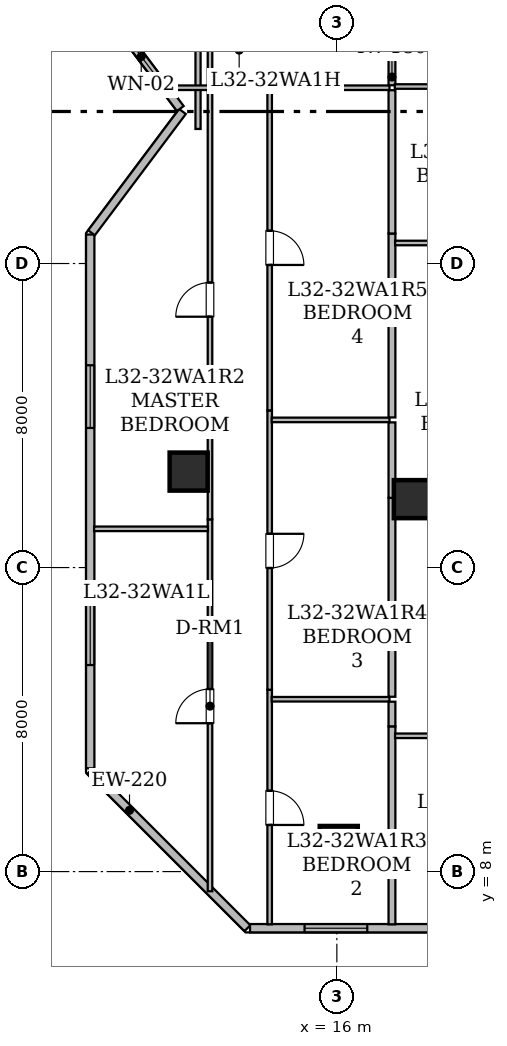
"""IFC4 building model, lengths in metres.
Left out: names, types, materials, properties, quantities, classifications, styles, units other than length and angle.
Written with IfcOpenShell. Run it as: python <this file> out.ifc"""

import sys

from ifc_helpers import new_model, si_unit, direction, frame, frame_2d, origin, origin_2d, place, context, subcontext, project, spatial, rectangle, hollow_rectangle, extrude, element, fill, save


model = new_model("IFC4")
c1 = context("Model", 3, precision=1e-05, world=origin(), true_north=direction((0.0, 1.0)))
c2 = subcontext(c1, "Body", "Model", "MODEL_VIEW")
j1 = project(units=[si_unit("LENGTHUNIT", "METRE"), si_unit("PLANEANGLEUNIT", "RADIAN")], contexts=[c1])
p1 = place(None, origin())
s1 = spatial("IfcSite", under=j1, at=p1, CompositionType="ELEMENT")
p2 = place(p1, origin())
s2 = spatial("IfcBuilding", under=s1, at=p2, CompositionType="ELEMENT")
p3 = place(p2, frame((0.0, 0.0, 127.45)))
s3 = spatial("IfcBuildingStorey", under=s2, at=p3, CompositionType="ELEMENT", Elevation=127.45)
for number, where, z_axis, x_axis in (
    (1, (16.05, 8.7, 0.0), (0.0, 0.0, 1.0), (1.0, 0.0, 0.0)),
    (2, (12.1, 18.525, 0.0), (0.0, 0.0, 1.0), (1.0, 0.0, 0.0)),
    (3, (18.0, 17.8, 0.0), (0.0, 0.0, 1.0), (1.0, 0.0, 0.0)),
):
    element("IfcColumn", number, at=place(p3, frame(where, z_axis=z_axis, x_axis=x_axis)), inside=s3, PredefinedType="COLUMN", context=c2, shape_type="SweptSolid", body=[
        extrude(hollow_rectangle(XDim=1.0, YDim=1.0, WallThickness=0.05, at=origin_2d()), origin(), (0.0, 0.0, 1.0), 3.65),
    ])
p4 = place(p3, frame((13.646, 6.51, 0.0), z_axis=(0.0, 0.0, 1.0), x_axis=(-0.707106781187, 0.707106781187, 0.0)))
e4 = element("IfcWall", 4, at=p4, inside=s3, PredefinedType="STANDARD", context=c2, shape_type="SweptSolid", body=[
    extrude(rectangle(XDim=5.849, YDim=0.22, at=frame_2d((2.925, 0.0))), origin(), (0.0, 0.0, 1.0), 3.43),
])
p5 = place(p3, frame((9.51, 10.717, 0.0), z_axis=(0.0, 0.0, 1.0), x_axis=(0.0, 1.0, 0.0)))
e5 = element("IfcWall", 5, at=p5, inside=s3, PredefinedType="STANDARD", context=c2, shape_type="SweptSolid", body=[
    extrude(rectangle(XDim=14.046, YDim=0.22, at=frame_2d((7.023, 0.0))), origin(), (0.0, 0.0, 1.0), 3.43),
])
p6 = place(p5, frame((2.718, 0.0, 0.85)))
e6 = element("IfcOpeningElement", 6, at=p6, cuts=e5, PredefinedType="OPENING", context=c2, shape_type="SweptSolid", body=[
    extrude(rectangle(XDim=1.65, YDim=1.55, at=frame_2d((0.825, 0.775))), frame((0.0, 0.12, 0.0), z_axis=(0.0, -1.0, 0.0), x_axis=(1.0, 0.0, 0.0)), (0.0, 0.0, 1.0), 0.24),
])
p7 = place(p5, frame((8.956, 0.0, 0.85)))
e7 = element("IfcOpeningElement", 7, at=p7, cuts=e5, PredefinedType="OPENING", context=c2, shape_type="SweptSolid", body=[
    extrude(rectangle(XDim=1.65, YDim=1.55, at=frame_2d((0.825, 0.775))), frame((0.0, 0.12, 0.0), z_axis=(0.0, -1.0, 0.0), x_axis=(1.0, 0.0, 0.0)), (0.0, 0.0, 1.0), 0.24),
])
p8 = place(p3, frame((9.544, 24.808, 0.0), z_axis=(0.0, 0.0, 1.0), x_axis=(0.600019580308, 0.799985314394, 0.0)))
e8 = element("IfcWall", 8, at=p8, inside=s3, PredefinedType="STANDARD", context=c2, shape_type="SweptSolid", body=[
    extrude(rectangle(XDim=3.99, YDim=0.22, at=frame_2d((1.995, 0.0))), origin(), (0.0, 0.0, 1.0), 3.43),
])
p9 = place(p3, frame((11.881, 28.077, 0.0), z_axis=(0.0, 0.0, 1.0), x_axis=(-0.600158184825, 0.799881336942, 0.0)))
e9 = element("IfcWall", 9, at=p9, inside=s3, PredefinedType="STANDARD", context=c2, shape_type="SweptSolid", body=[
    extrude(rectangle(XDim=3.951, YDim=0.22, at=frame_2d((1.975, 0.0))), origin(), (0.0, 0.0, 1.0), 3.43),
])
p10 = place(p9, frame((0.964, 0.0, 0.85)))
e10 = element("IfcOpeningElement", 10, at=p10, cuts=e9, PredefinedType="OPENING", context=c2, shape_type="SweptSolid", body=[
    extrude(rectangle(XDim=1.5, YDim=1.6, at=frame_2d((0.75, 0.8))), frame((0.0, 0.12, 0.0), z_axis=(0.0, -1.0, 0.0), x_axis=(1.0, 0.0, 0.0)), (0.0, 0.0, 1.0), 0.24),
])
p11 = place(p3, frame((52.283, 6.51, 0.0), z_axis=(0.0, 0.0, 1.0), x_axis=(-1.0, 0.0, 0.0)))
e11 = element("IfcWall", 11, at=p11, inside=s3, PredefinedType="STANDARD", context=c2, shape_type="SweptSolid", body=[
    extrude(rectangle(XDim=38.568, YDim=0.22, at=frame_2d((19.284, 0.0))), origin(), (0.0, 0.0, 1.0), 3.43),
])
p12 = place(p11, frame((20.408, 0.0, 0.85)))
e12 = element("IfcOpeningElement", 12, at=p12, cuts=e11, PredefinedType="OPENING", context=c2, shape_type="SweptSolid", body=[
    extrude(rectangle(XDim=1.65, YDim=1.55, at=frame_2d((0.825, 0.775))), frame((0.0, 0.12, 0.0), z_axis=(0.0, -1.0, 0.0), x_axis=(1.0, 0.0, 0.0)), (0.0, 0.0, 1.0), 0.24),
])
p13 = place(p11, frame((35.483, 0.0, 0.85)))
e13 = element("IfcOpeningElement", 13, at=p13, cuts=e11, PredefinedType="OPENING", context=c2, shape_type="SweptSolid", body=[
    extrude(rectangle(XDim=1.65, YDim=1.55, at=frame_2d((0.825, 0.775))), frame((0.0, 0.12, 0.0), z_axis=(0.0, -1.0, 0.0), x_axis=(1.0, 0.0, 0.0)), (0.0, 0.0, 1.0), 0.24),
])
p14 = place(p11, frame((25.888, 0.0, 0.85)))
e14 = element("IfcOpeningElement", 14, at=p14, cuts=e11, PredefinedType="OPENING", context=c2, shape_type="SweptSolid", body=[
    extrude(rectangle(XDim=1.65, YDim=1.55, at=frame_2d((0.825, 0.775))), frame((0.0, 0.12, 0.0), z_axis=(0.0, -1.0, 0.0), x_axis=(1.0, 0.0, 0.0)), (0.0, 0.0, 1.0), 0.24),
])
p15 = place(p11, frame((28.168, 0.0, 0.8)))
e15 = element("IfcOpeningElement", 15, at=p15, cuts=e11, PredefinedType="OPENING", context=c2, shape_type="SweptSolid", body=[
    extrude(rectangle(XDim=1.2, YDim=1.5, at=frame_2d((0.6, 0.75))), frame((0.0, 0.12, 0.0), z_axis=(0.0, -1.0, 0.0), x_axis=(1.0, 0.0, 0.0)), (0.0, 0.0, 1.0), 0.24),
])
p16 = place(p11, frame((31.371, 0.0, 0.85)))
e16 = element("IfcOpeningElement", 16, at=p16, cuts=e11, PredefinedType="OPENING", context=c2, shape_type="SweptSolid", body=[
    extrude(rectangle(XDim=1.65, YDim=1.55, at=frame_2d((0.825, 0.775))), frame((0.0, 0.12, 0.0), z_axis=(0.0, -1.0, 0.0), x_axis=(1.0, 0.0, 0.0)), (0.0, 0.0, 1.0), 0.24),
])
p17 = place(p11, frame((13.143, 0.0, 0.85)))
e17 = element("IfcOpeningElement", 17, at=p17, cuts=e11, PredefinedType="OPENING", context=c2, shape_type="SweptSolid", body=[
    extrude(rectangle(XDim=1.65, YDim=1.55, at=frame_2d((0.825, 0.775))), frame((0.0, 0.12, 0.0), z_axis=(0.0, -1.0, 0.0), x_axis=(1.0, 0.0, 0.0)), (0.0, 0.0, 1.0), 0.24),
])
p18 = place(p11, frame((6.688, 0.0, 0.85)))
e18 = element("IfcOpeningElement", 18, at=p18, cuts=e11, PredefinedType="OPENING", context=c2, shape_type="SweptSolid", body=[
    extrude(rectangle(XDim=1.65, YDim=1.55, at=frame_2d((0.825, 0.775))), frame((0.0, 0.12, 0.0), z_axis=(0.0, -1.0, 0.0), x_axis=(1.0, 0.0, 0.0)), (0.0, 0.0, 1.0), 0.24),
])
p19 = place(p3, frame((12.347, 27.54, 0.0), z_axis=(0.0, 0.0, 1.0), x_axis=(0.0, 1.0, 0.0)))
e19 = element("IfcWall", 19, at=p19, inside=s3, PredefinedType="PARTITIONING", context=c2, shape_type="SweptSolid", body=[
    extrude(rectangle(XDim=6.178, YDim=0.135, at=frame_2d((3.089, 0.0))), origin(), (0.0, 0.0, 1.0), 2.876),
])
p20 = place(p3, frame((12.662, 7.483, 0.0), z_axis=(0.0, 0.0, 1.0), x_axis=(0.0, 1.0, 0.0)))
e20 = element("IfcWall", 20, at=p20, inside=s3, PredefinedType="PARTITIONING", context=c2, shape_type="SweptSolid", body=[
    extrude(rectangle(XDim=9.785, YDim=0.12, at=frame_2d((4.893, 0.0))), origin(), (0.0, 0.0, 1.0), 2.876),
])
p21 = place(p20, frame((4.421, 0.0, 0.0)))
e21 = element("IfcOpeningElement", 21, at=p21, cuts=e20, PredefinedType="OPENING", context=c2, shape_type="SweptSolid", body=[
    extrude(rectangle(XDim=0.9, YDim=2.1, at=frame_2d((0.45, 1.05))), frame((0.0, 0.07, 0.0), z_axis=(0.0, -1.0, 0.0), x_axis=(1.0, 0.0, 0.0)), (0.0, 0.0, 1.0), 0.14),
])
p22 = place(p3, frame((12.662, 17.268, 0.0), z_axis=(0.0, 0.0, 1.0), x_axis=(0.0, 1.0, 0.0)))
e22 = element("IfcWall", 22, at=p22, inside=s3, PredefinedType="PARTITIONING", context=c2, shape_type="SweptSolid", body=[
    extrude(rectangle(XDim=14.022, YDim=0.12, at=frame_2d((7.011, 0.0))), origin(), (0.0, 0.0, 1.0), 2.647),
])
p23 = place(p22, frame((5.332, 0.0, 0.0)))
e23 = element("IfcOpeningElement", 23, at=p23, cuts=e22, PredefinedType="OPENING", context=c2, shape_type="SweptSolid", body=[
    extrude(rectangle(XDim=0.9, YDim=2.1, at=frame_2d((0.45, 1.05))), frame((0.0, 0.07, 0.0), z_axis=(0.0, -1.0, 0.0), x_axis=(1.0, 0.0, 0.0)), (0.0, 0.0, 1.0), 0.14),
])
p24 = place(p3, frame((15.327, 28.625, 0.0), z_axis=(0.0, 0.0, 1.0), x_axis=(-1.0, 0.0, 0.0)))
e24 = element("IfcWall", 24, at=p24, inside=s3, PredefinedType="PARTITIONING", context=c2, shape_type="SweptSolid", body=[
    extrude(rectangle(XDim=3.845, YDim=0.12, at=frame_2d((1.922, 0.0))), origin(), (0.0, 0.0, 1.0), 2.876),
])
p25 = place(p3, frame((14.232, 12.784, 0.0), z_axis=(0.0, 0.0, 1.0), x_axis=(0.0, -1.0, 0.0)))
e25 = element("IfcWall", 25, at=p25, inside=s3, PredefinedType="PARTITIONING", context=c2, shape_type="SweptSolid", body=[
    extrude(rectangle(XDim=6.172, YDim=0.12, at=frame_2d((3.086, 0.0))), origin(), (0.0, 0.0, 1.0), 2.876),
])
p26 = place(p25, frame((2.657, 0.0, 0.0)))
e26 = element("IfcOpeningElement", 26, at=p26, cuts=e25, PredefinedType="OPENING", context=c2, shape_type="SweptSolid", body=[
    extrude(rectangle(XDim=0.9, YDim=2.1, at=frame_2d((0.45, 1.05))), frame((0.0, 0.07, 0.0), z_axis=(0.0, -1.0, 0.0), x_axis=(1.0, 0.0, 0.0)), (0.0, 0.0, 1.0), 0.14),
])
p27 = place(p3, frame((14.232, 20.134, 0.0), z_axis=(0.0, 0.0, 1.0), x_axis=(0.0, -1.0, 0.0)))
e27 = element("IfcWall", 27, at=p27, inside=s3, PredefinedType="PARTITIONING", context=c2, shape_type="SweptSolid", body=[
    extrude(rectangle(XDim=7.35, YDim=0.12, at=frame_2d((3.675, 0.0))), origin(), (0.0, 0.0, 1.0), 2.647),
])
p28 = place(p27, frame((3.246, 0.0, 0.0)))
e28 = element("IfcOpeningElement", 28, at=p28, cuts=e27, PredefinedType="OPENING", context=c2, shape_type="SweptSolid", body=[
    extrude(rectangle(XDim=0.9, YDim=2.1, at=frame_2d((0.45, 1.05))), frame((0.0, 0.07, 0.0), z_axis=(0.0, -1.0, 0.0), x_axis=(1.0, 0.0, 0.0)), (0.0, 0.0, 1.0), 0.14),
])
p29 = place(p3, frame((17.385, 28.625, 0.0), z_axis=(0.0, 0.0, 1.0), x_axis=(-1.0, 0.0, 0.0)))
e29 = element("IfcWall", 29, at=p29, inside=s3, PredefinedType="PARTITIONING", context=c2, shape_type="SweptSolid", body=[
    extrude(rectangle(XDim=2.058, YDim=0.12, at=frame_2d((1.029, 0.0))), origin(), (0.0, 0.0, 1.0), 3.43),
])
p30 = place(p3, frame((14.232, 28.69, 0.0), z_axis=(0.0, 0.0, 1.0), x_axis=(0.0, -1.0, 0.0)))
e30 = element("IfcWall", 30, at=p30, inside=s3, PredefinedType="PARTITIONING", context=c2, shape_type="SweptSolid", body=[
    extrude(rectangle(XDim=8.556, YDim=0.12, at=frame_2d((4.278, 0.0))), origin(), (0.0, 0.0, 1.0), 3.43),
])
p31 = place(p30, frame((3.828, 0.0, 0.0)))
e31 = element("IfcOpeningElement", 31, at=p31, cuts=e30, PredefinedType="OPENING", context=c2, shape_type="SweptSolid", body=[
    extrude(rectangle(XDim=0.9, YDim=2.1, at=frame_2d((0.45, 1.05))), frame((0.0, 0.07, 0.0), z_axis=(0.0, -1.0, 0.0), x_axis=(1.0, 0.0, 0.0)), (0.0, 0.0, 1.0), 0.14),
])
p32 = place(p3, frame((17.45, 30.14, 0.0), z_axis=(0.0, 0.0, 1.0), x_axis=(0.0, -1.0, 0.0)))
e32 = element("IfcWall", 32, at=p32, inside=s3, PredefinedType="STANDARD", context=c2, shape_type="SweptSolid", body=[
    extrude(rectangle(XDim=1.45, YDim=0.18, at=frame_2d((0.725, 0.0))), origin(), (0.0, 0.0, 1.0), 3.43),
])
p33 = place(p3, frame((9.612, 17.019, 0.0), z_axis=(0.0, 0.0, 1.0), x_axis=(1.0, 0.0, 0.0)))
e33 = element("IfcWall", 33, at=p33, inside=s3, PredefinedType="PARTITIONING", context=c2, shape_type="SweptSolid", body=[
    extrude(rectangle(XDim=2.996, YDim=0.12, at=frame_2d((1.498, 0.0))), origin(), (0.0, 0.0, 1.0), 2.876),
])
p34 = place(p3, frame((14.286, 12.535, 0.0), z_axis=(0.0, 0.0, 1.0), x_axis=(1.0, 0.0, 0.0)))
e34 = element("IfcWall", 34, at=p34, inside=s3, PredefinedType="PARTITIONING", context=c2, shape_type="SweptSolid", body=[
    extrude(rectangle(XDim=3.099, YDim=0.12, at=frame_2d((1.55, 0.0))), origin(), (0.0, 0.0, 1.0), 2.647),
])
p35 = place(p3, frame((17.45, 11.822, 0.0), z_axis=(0.0, 0.0, 1.0), x_axis=(0.0, -1.0, 0.0)))
e35 = element("IfcWall", 35, at=p35, inside=s3, PredefinedType="STANDARD", context=c2, shape_type="SweptSolid", body=[
    extrude(rectangle(XDim=5.21, YDim=0.18, at=frame_2d((2.605, 0.0))), origin(), (0.0, 0.0, 1.0), 2.876),
])
p36 = place(p3, frame((17.45, 12.47, 0.0), z_axis=(0.0, 0.0, 1.0), x_axis=(0.0, -1.0, 0.0)))
e36 = element("IfcWall", 36, at=p36, inside=s3, PredefinedType="STANDARD", context=c2, shape_type="SweptSolid", body=[
    extrude(rectangle(XDim=0.648, YDim=0.18, at=frame_2d((0.324, 0.0))), origin(), (0.0, 0.0, 1.0), 3.43),
])
p37 = place(p3, frame((14.286, 19.885, 0.0), z_axis=(0.0, 0.0, 1.0), x_axis=(1.0, 0.0, 0.0)))
e37 = element("IfcWall", 37, at=p37, inside=s3, PredefinedType="PARTITIONING", context=c2, shape_type="SweptSolid", body=[
    extrude(rectangle(XDim=3.099, YDim=0.12, at=frame_2d((1.55, 0.0))), origin(), (0.0, 0.0, 1.0), 3.43),
])
p38 = place(p3, frame((17.45, 17.833, 0.0), z_axis=(0.0, 0.0, 1.0), x_axis=(0.0, -1.0, 0.0)))
e38 = element("IfcWall", 38, at=p38, inside=s3, PredefinedType="STANDARD", context=c2, shape_type="SweptSolid", body=[
    extrude(rectangle(XDim=5.233, YDim=0.18, at=frame_2d((2.616, 0.0))), origin(), (0.0, 0.0, 1.0), 2.647),
])
p39 = place(p3, frame((17.45, 19.82, 0.0), z_axis=(0.0, 0.0, 1.0), x_axis=(0.0, -1.0, 0.0)))
e39 = element("IfcWall", 39, at=p39, inside=s3, PredefinedType="STANDARD", context=c2, shape_type="SweptSolid", body=[
    extrude(rectangle(XDim=1.987, YDim=0.18, at=frame_2d((0.994, 0.0))), origin(), (0.0, 0.0, 1.0), 2.647),
])
p40 = place(p3, frame((17.45, 24.789, 0.0), z_axis=(0.0, 0.0, 1.0), x_axis=(0.0, -1.0, 0.0)))
e40 = element("IfcWall", 40, at=p40, inside=s3, PredefinedType="STANDARD", context=c2, shape_type="SweptSolid", body=[
    extrude(rectangle(XDim=4.839, YDim=0.18, at=frame_2d((2.419, 0.0))), origin(), (0.0, 0.0, 1.0), 3.43),
])
p41 = place(p3, frame((17.45, 28.56, 0.0), z_axis=(0.0, 0.0, 1.0), x_axis=(0.0, -1.0, 0.0)))
e41 = element("IfcWall", 41, at=p41, inside=s3, PredefinedType="STANDARD", context=c2, shape_type="SweptSolid", body=[
    extrude(rectangle(XDim=3.771, YDim=0.18, at=frame_2d((1.885, 0.0))), origin(), (0.0, 0.0, 1.0), 3.43),
])
p42 = place(p3, frame((17.532, 11.573, 0.0), z_axis=(0.0, 0.0, 1.0), x_axis=(1.0, 0.0, 0.0)))
e42 = element("IfcWall", 42, at=p42, inside=s3, PredefinedType="PARTITIONING", context=c2, shape_type="SweptSolid", body=[
    extrude(rectangle(XDim=5.139, YDim=0.12, at=frame_2d((2.569, 0.0))), origin(), (0.0, 0.0, 1.0), 3.43),
])
for number, where, z_axis, x_axis in (
    (43, (17.532, 17.583, 0.0), (0.0, 0.0, 1.0), (1.0, 0.0, 0.0)),
    (44, (17.532, 24.54, 0.0), (0.0, 0.0, 1.0), (1.0, 0.0, 0.0)),
):
    element("IfcWall", number, at=place(p3, frame(where, z_axis=z_axis, x_axis=x_axis)), inside=s3, PredefinedType="PARTITIONING", context=c2, shape_type="SweptSolid", body=[
        extrude(rectangle(XDim=5.139, YDim=0.12, at=frame_2d((2.569, 0.0))), origin(), (0.0, 0.0, 1.0), 2.647),
    ])
p43 = place(p3, frame((17.524, 28.657, 0.0), z_axis=(0.0, 0.0, 1.0), x_axis=(1.0, 0.0, 0.0)))
e45 = element("IfcWall", 45, at=p43, inside=s3, PredefinedType="PARTITIONING", context=c2, shape_type="SweptSolid", body=[
    extrude(rectangle(XDim=5.147, YDim=0.12, at=frame_2d((2.573, 0.0))), origin(), (0.0, 0.0, 1.0), 2.647),
])
p44 = place(p10, origin())
e46 = element("IfcWindow", 46, at=p44, inside=s3, PartitioningType="SINGLE_PANEL", PredefinedType="WINDOW", context=c2, shape_type="SweptSolid", body=[
    extrude(rectangle(XDim=1.5, YDim=1.6, at=frame_2d((0.75, 0.8))), frame((0.0, 0.03, 0.0), z_axis=(0.0, -1.0, 0.0), x_axis=(1.0, 0.0, 0.0)), (0.0, 0.0, 1.0), 0.06),
])
fill(e10, e46)
p45 = place(p6, origin())
e47 = element("IfcWindow", 47, at=p45, inside=s3, PartitioningType="SINGLE_PANEL", PredefinedType="WINDOW", context=c2, shape_type="SweptSolid", body=[
    extrude(rectangle(XDim=1.65, YDim=1.55, at=frame_2d((0.825, 0.775))), frame((0.0, 0.03, 0.0), z_axis=(0.0, -1.0, 0.0), x_axis=(1.0, 0.0, 0.0)), (0.0, 0.0, 1.0), 0.06),
])
fill(e6, e47)
p46 = place(p7, origin())
e48 = element("IfcWindow", 48, at=p46, inside=s3, PartitioningType="SINGLE_PANEL", PredefinedType="WINDOW", context=c2, shape_type="SweptSolid", body=[
    extrude(rectangle(XDim=1.65, YDim=1.55, at=frame_2d((0.825, 0.775))), frame((0.0, 0.03, 0.0), z_axis=(0.0, -1.0, 0.0), x_axis=(1.0, 0.0, 0.0)), (0.0, 0.0, 1.0), 0.06),
])
fill(e7, e48)
p47 = place(p13, origin())
e49 = element("IfcWindow", 49, at=p47, inside=s3, PartitioningType="SINGLE_PANEL", PredefinedType="WINDOW", context=c2, shape_type="SweptSolid", body=[
    extrude(rectangle(XDim=1.65, YDim=1.55, at=frame_2d((0.825, 0.775))), frame((0.0, 0.03, 0.0), z_axis=(0.0, -1.0, 0.0), x_axis=(1.0, 0.0, 0.0)), (0.0, 0.0, 1.0), 0.06),
])
fill(e13, e49)
p48 = place(p21, origin())
e50 = element("IfcDoor", 50, at=p48, inside=s3, OperationType="SINGLE_SWING_LEFT", PredefinedType="DOOR", context=c2, shape_type="SweptSolid", body=[
    extrude(rectangle(XDim=0.9, YDim=2.1, at=frame_2d((0.45, 1.05))), frame((0.0, 0.025, 0.0), z_axis=(0.0, -1.0, 0.0), x_axis=(1.0, 0.0, 0.0)), (0.0, 0.0, 1.0), 0.05),
])
fill(e21, e50)
p49 = place(p23, origin())
e51 = element("IfcDoor", 51, at=p49, inside=s3, OperationType="SINGLE_SWING_LEFT", PredefinedType="DOOR", context=c2, shape_type="SweptSolid", body=[
    extrude(rectangle(XDim=0.9, YDim=2.1, at=frame_2d((0.45, 1.05))), frame((0.0, 0.025, 0.0), z_axis=(0.0, -1.0, 0.0), x_axis=(1.0, 0.0, 0.0)), (0.0, 0.0, 1.0), 0.05),
])
fill(e23, e51)
p50 = place(p26, origin())
e52 = element("IfcDoor", 52, at=p50, inside=s3, OperationType="SINGLE_SWING_RIGHT", PredefinedType="DOOR", context=c2, shape_type="SweptSolid", body=[
    extrude(rectangle(XDim=0.9, YDim=2.1, at=frame_2d((0.45, 1.05))), frame((0.0, 0.025, 0.0), z_axis=(0.0, -1.0, 0.0), x_axis=(1.0, 0.0, 0.0)), (0.0, 0.0, 1.0), 0.05),
])
fill(e26, e52)
p51 = place(p28, origin())
e53 = element("IfcDoor", 53, at=p51, inside=s3, OperationType="SINGLE_SWING_LEFT", PredefinedType="DOOR", context=c2, shape_type="SweptSolid", body=[
    extrude(rectangle(XDim=0.9, YDim=2.1, at=frame_2d((0.45, 1.05))), frame((0.0, 0.025, 0.0), z_axis=(0.0, -1.0, 0.0), x_axis=(1.0, 0.0, 0.0)), (0.0, 0.0, 1.0), 0.05),
])
fill(e28, e53)
p52 = place(p31, origin())
e54 = element("IfcDoor", 54, at=p52, inside=s3, OperationType="SINGLE_SWING_RIGHT", PredefinedType="DOOR", context=c2, shape_type="SweptSolid", body=[
    extrude(rectangle(XDim=0.9, YDim=2.1, at=frame_2d((0.45, 1.05))), frame((0.0, 0.025, 0.0), z_axis=(0.0, -1.0, 0.0), x_axis=(1.0, 0.0, 0.0)), (0.0, 0.0, 1.0), 0.05),
])
fill(e31, e54)
save(model, sys.argv[1])
